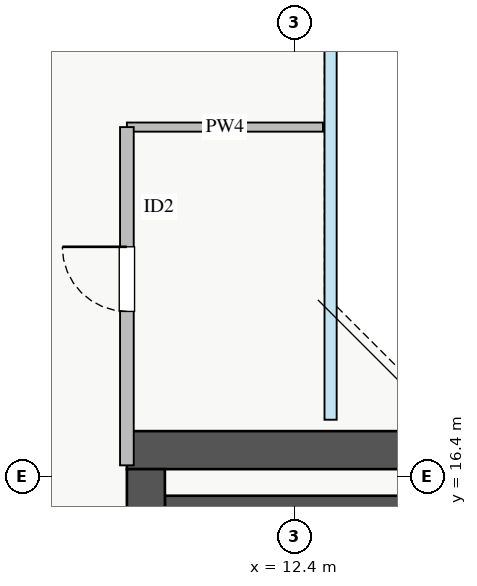
"""IFC4 building model, lengths in metres.
Left out: names, types, materials, properties, quantities, classifications, styles, units other than length and angle.
Written with IfcOpenShell. Run it as: python <this file> out.ifc"""

import sys

from ifc_helpers import new_model, si_unit, direction, frame, frame_2d, origin, place, context, subcontext, project, spatial, rectangle, extrude, source, transform, mapped, element, fill, save


model = new_model("IFC4")
c1 = context("Model", 3, precision=1e-05, world=origin(), true_north=direction((0.0, 1.0)))
c2 = subcontext(c1, "Body", "Model", "MODEL_VIEW")
j1 = project(units=[si_unit("LENGTHUNIT", "METRE"), si_unit("PLANEANGLEUNIT", "RADIAN")], contexts=[c1])
p1 = place(None, origin())
s1 = spatial("IfcSite", under=j1, at=p1, CompositionType="ELEMENT")
p2 = place(p1, origin())
s2 = spatial("IfcBuilding", under=s1, at=p2, CompositionType="ELEMENT")
p3 = place(p2, frame((0.0, 0.0, 226.25)))
s3 = spatial("IfcBuildingStorey", under=s2, at=p3, CompositionType="ELEMENT", Elevation=226.25)
p4 = place(p3, frame((10.7, 16.05, 0.0), z_axis=(0.0, 0.0, 1.0), x_axis=(1.0, 0.0, 0.0)))
e1 = element("IfcWall", 1, at=p4, inside=s3, PredefinedType="SHEAR", context=c2, shape_type="SweptSolid", body=[
    extrude(rectangle(XDim=7.45, YDim=0.2, at=frame_2d((3.725, 0.0))), origin(), (0.0, 0.0, 1.0), 3.25),
])
p5 = place(p3, frame((10.2, 16.75, 0.0), z_axis=(0.0, 0.0, 1.0), x_axis=(1.0, 0.0, 0.0)))
e2 = element("IfcWall", 2, at=p5, inside=s3, PredefinedType="SHEAR", context=c2, shape_type="SweptSolid", body=[
    extrude(rectangle(XDim=17.6, YDim=0.5, at=frame_2d((8.8, 0.0))), origin(), (0.0, 0.0, 1.0), 3.25),
])
p6 = place(p3, frame((10.45, 10.3, 0.0), z_axis=(0.0, 0.0, 1.0), x_axis=(0.0, 1.0, 0.0)))
e3 = element("IfcWall", 3, at=p6, inside=s3, PredefinedType="SHEAR", context=c2, shape_type="SweptSolid", body=[
    extrude(rectangle(XDim=6.2, YDim=0.5, at=frame_2d((3.1, 0.0))), origin(), (0.0, 0.0, 1.0), 3.25),
])
p7 = place(p3, frame((10.2, 21.0, 0.0), z_axis=(0.0, 0.0, 1.0), x_axis=(1.0, 0.0, 0.0)))
e4 = element("IfcWall", 4, at=p7, inside=s3, PredefinedType="PLUMBINGWALL", context=c2, shape_type="SweptSolid", body=[
    extrude(rectangle(XDim=2.58, YDim=0.12, at=frame_2d((1.29, 0.0))), origin(), (0.0, 0.0, 1.0), 3.07),
])
p8 = place(p3, frame((10.2, 16.55, 0.0), z_axis=(0.0, 0.0, 1.0), x_axis=(0.0, 1.0, 0.0)))
e5 = element("IfcWall", 5, at=p8, inside=s3, PredefinedType="PARTITIONING", context=c2, shape_type="SweptSolid", body=[
    extrude(rectangle(XDim=4.45, YDim=0.18, at=frame_2d((2.225, 0.0))), origin(), (0.0, 0.0, 1.0), 3.07),
])
p9 = place(p8, frame((2.025, 0.0, 0.0)))
e6 = element("IfcOpeningElement", 6, at=p9, cuts=e5, PredefinedType="OPENING", context=c2, shape_type="SweptSolid", body=[
    extrude(rectangle(XDim=0.85, YDim=2.05, at=frame_2d((0.425, 1.025))), frame((0.0, 0.1, 0.0), z_axis=(0.0, -1.0, 0.0), x_axis=(1.0, 0.0, 0.0)), (0.0, 0.0, 1.0), 0.2),
])
m1 = source(origin(), c2, "Body", "SweptSolid", [
    extrude(rectangle(XDim=0.85, YDim=2.05, at=frame_2d((0.425, 1.025))), frame((0.0, 0.025, 0.0), z_axis=(0.0, -1.0, 0.0), x_axis=(1.0, 0.0, 0.0)), (0.0, 0.0, 1.0), 0.05),
])
p10 = place(p9, origin())
e7 = element("IfcDoor", 7, at=p10, inside=s3, OperationType="SINGLE_SWING_RIGHT", PredefinedType="DOOR", context=c2, shape_type="MappedRepresentation", body=[
    mapped(m1, transform((0.0, 0.0, 0.0), x_axis=(1.0, 0.0, 0.0), y_axis=(0.0, 1.0, 0.0), z_axis=(0.0, 0.0, 1.0), scale=1.0)),
])
fill(e6, e7)
save(model, sys.argv[1])
